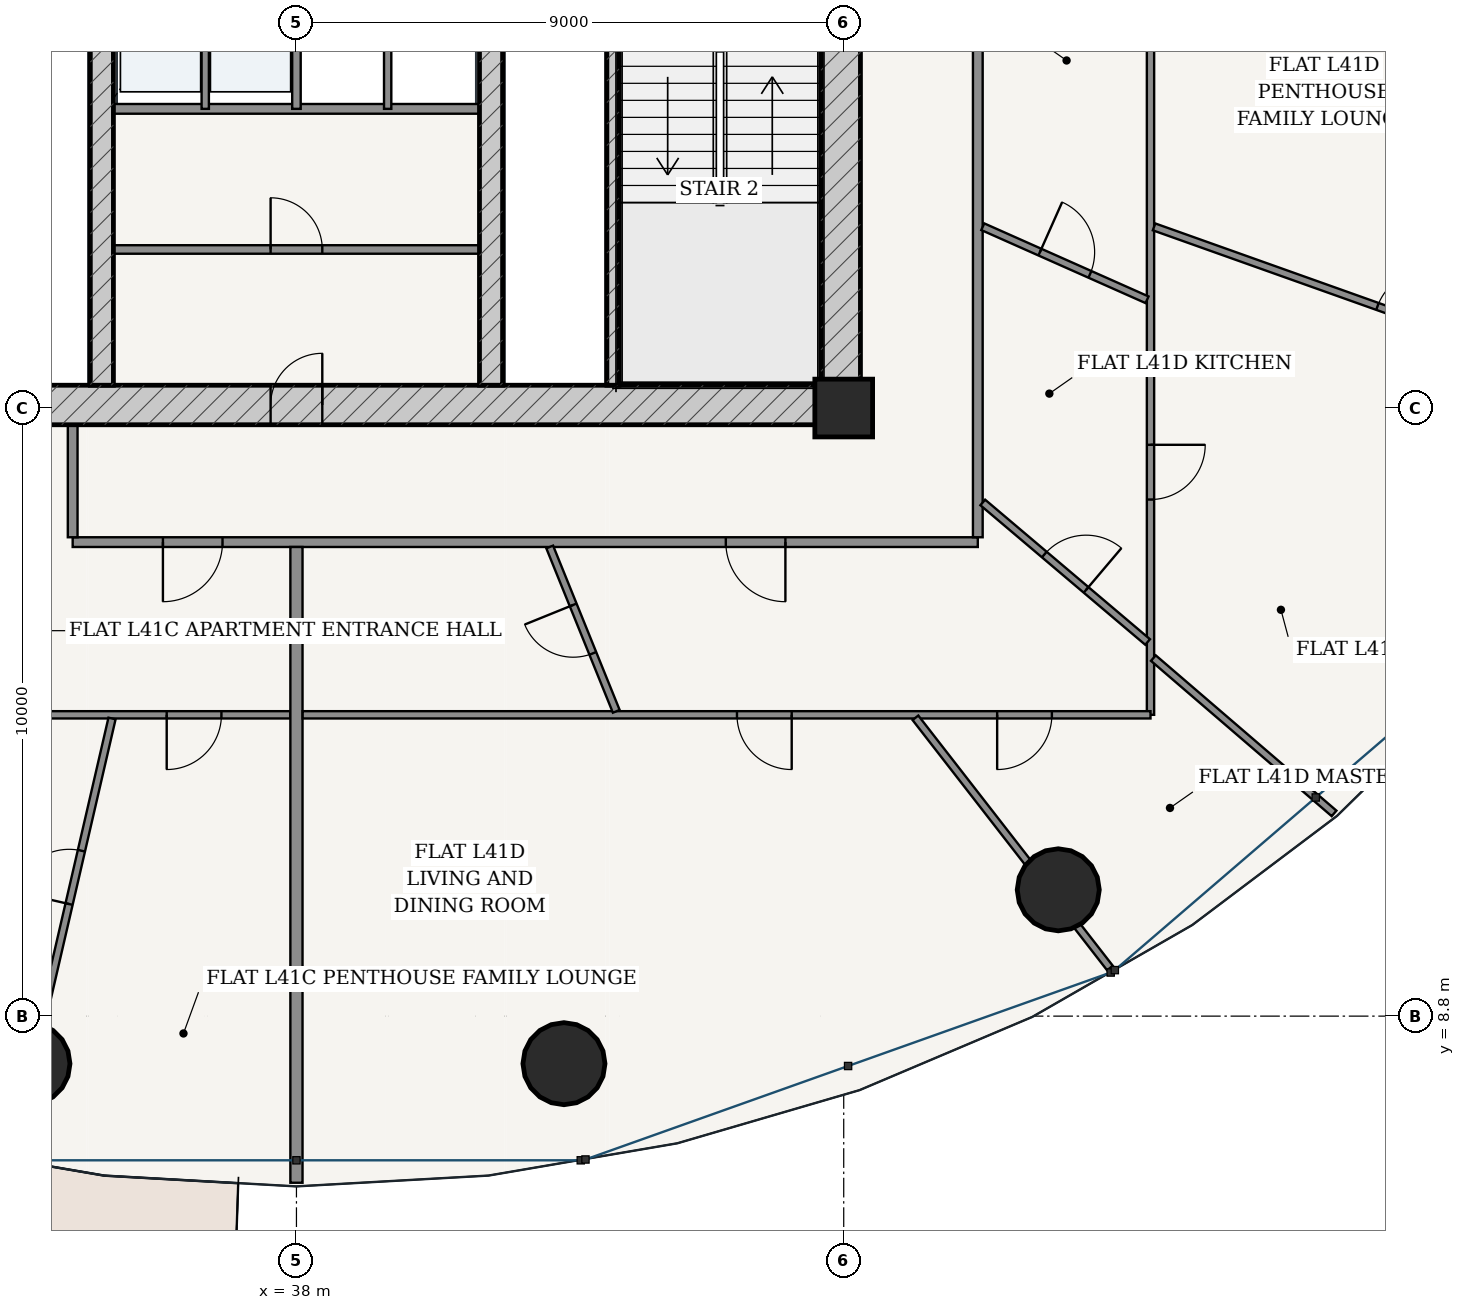
"""IFC4 building model, lengths in metres.
Left out: names, types, materials, properties, quantities, classifications, styles, units other than length and angle.
Written with IfcOpenShell. Run it as: python <this file> out.ifc"""

import sys

from ifc_helpers import new_model, si_unit, direction, frame, frame_2d, origin, origin_2d, place, context, subcontext, project, spatial, rectangle, hollow_circle, extrude, source, transform, mapped, element, fill, save


model = new_model("IFC4")
c1 = context("Model", 3, precision=1e-05, world=origin(), true_north=direction((-0.2419218956, 0.970295726276)))
c2 = subcontext(c1, "Body", "Model", "MODEL_VIEW")
j1 = project(units=[si_unit("LENGTHUNIT", "METRE"), si_unit("PLANEANGLEUNIT", "RADIAN")], contexts=[c1])
p1 = place(None, origin())
s1 = spatial("IfcSite", under=j1, at=p1, CompositionType="ELEMENT")
p2 = place(p1, origin())
s2 = spatial("IfcBuilding", under=s1, at=p2, CompositionType="ELEMENT")
p3 = place(p2, frame((0.0, 0.0, 157.0)))
s3 = spatial("IfcBuildingStorey", under=s2, at=p3, CompositionType="ELEMENT", Elevation=157.0)
p4 = place(p3, frame((47.0, 18.8, 0.0), z_axis=(0.0, 0.0, 1.0), x_axis=(1.0, 0.0, 0.0)))
e1 = element("IfcColumn", 1, at=p4, inside=s3, PredefinedType="COLUMN", context=c2, shape_type="SweptSolid", body=[
    extrude(rectangle(XDim=0.95, YDim=0.95, at=origin_2d()), origin(), (0.0, 0.0, 1.0), 3.6),
])
p5 = place(p3, frame((28.725, 18.85, 0.0), z_axis=(0.0, 0.0, 1.0), x_axis=(1.0, 0.0, 0.0)))
e2 = element("IfcWall", 2, at=p5, inside=s3, PredefinedType="SHEAR", context=c2, shape_type="SweptSolid", body=[
    extrude(rectangle(XDim=18.55, YDim=0.65, at=frame_2d((9.275, 0.0))), origin(), (0.0, 0.0, 1.0), 3.33),
])
p6 = place(p5, frame((8.85, 0.0, 0.0)))
e3 = element("IfcOpeningElement", 3, at=p6, cuts=e2, PredefinedType="OPENING", context=c2, shape_type="SweptSolid", body=[
    extrude(rectangle(XDim=0.85, YDim=2.1, at=frame_2d((0.425, 1.05))), frame((0.0, 0.335, 0.0), z_axis=(0.0, -1.0, 0.0), x_axis=(1.0, 0.0, 0.0)), (0.0, 0.0, 1.0), 0.67),
])
p7 = place(p3, frame((46.95, 19.175, 0.0), z_axis=(0.0, 0.0, 1.0), x_axis=(0.0, 1.0, 0.0)))
e4 = element("IfcWall", 4, at=p7, inside=s3, PredefinedType="SHEAR", context=c2, shape_type="SweptSolid", body=[
    extrude(rectangle(XDim=15.25, YDim=0.65, at=frame_2d((7.625, 0.0))), origin(), (0.0, 0.0, 1.0), 3.33),
])
p8 = place(p7, frame((9.875, 0.0, 0.0)))
e5 = element("IfcOpeningElement", 5, at=p8, cuts=e4, PredefinedType="OPENING", context=c2, shape_type="SweptSolid", body=[
    extrude(rectangle(XDim=1.5, YDim=2.2, at=frame_2d((0.75, 1.1))), frame((0.0, 0.335, 0.0), z_axis=(0.0, -1.0, 0.0), x_axis=(1.0, 0.0, 0.0)), (0.0, 0.0, 1.0), 0.67),
])
p9 = place(p3, frame((43.205, 19.175, 0.0), z_axis=(0.0, 0.0, 1.0), x_axis=(0.0, 1.0, 0.0)))
e6 = element("IfcWall", 6, at=p9, inside=s3, PredefinedType="SOLIDWALL", context=c2, shape_type="SweptSolid", body=[
    extrude(rectangle(XDim=7.375, YDim=0.2, at=frame_2d((3.688, 0.0))), origin(), (0.0, 0.0, 1.0), 3.33),
])
p10 = place(p3, frame((34.8, 19.175, 0.0), z_axis=(0.0, 0.0, 1.0), x_axis=(0.0, 1.0, 0.0)))
e7 = element("IfcWall", 7, at=p10, inside=s3, PredefinedType="SHEAR", context=c2, shape_type="SweptSolid", body=[
    extrude(rectangle(XDim=15.25, YDim=0.38, at=frame_2d((7.625, 0.0))), origin(), (0.0, 0.0, 1.0), 3.33),
])
p11 = place(p10, frame((7.8, 0.0, 0.0)))
e8 = element("IfcOpeningElement", 8, at=p11, cuts=e7, PredefinedType="OPENING", context=c2, shape_type="SweptSolid", body=[
    extrude(rectangle(XDim=1.05, YDim=2.15, at=frame_2d((0.525, 1.075))), frame((0.0, 0.2, 0.0), z_axis=(0.0, -1.0, 0.0), x_axis=(1.0, 0.0, 0.0)), (0.0, 0.0, 1.0), 0.4),
])
p12 = place(p3, frame((41.2, 19.175, 0.0), z_axis=(0.0, 0.0, 1.0), x_axis=(0.0, 1.0, 0.0)))
e9 = element("IfcWall", 9, at=p12, inside=s3, PredefinedType="SHEAR", context=c2, shape_type="SweptSolid", body=[
    extrude(rectangle(XDim=15.25, YDim=0.38, at=frame_2d((7.625, 0.0))), origin(), (0.0, 0.0, 1.0), 3.33),
])
p13 = place(p12, frame((7.8, 0.0, 0.0)))
e10 = element("IfcOpeningElement", 10, at=p13, cuts=e9, PredefinedType="OPENING", context=c2, shape_type="SweptSolid", body=[
    extrude(rectangle(XDim=1.05, YDim=2.15, at=frame_2d((0.525, 1.075))), frame((0.0, 0.2, 0.0), z_axis=(0.0, -1.0, 0.0), x_axis=(1.0, 0.0, 0.0)), (0.0, 0.0, 1.0), 0.4),
])
for number, where, z_axis, x_axis in (
    (11, (33.601, 8.018, 0.0), (0.0, 0.0, 1.0), (1.0, 0.0, 0.0)),
    (12, (42.399, 8.018, 0.0), (0.0, 0.0, 1.0), (1.0, 0.0, 0.0)),
    (13, (50.528, 10.877, 0.0), (0.0, 0.0, 1.0), (1.0, 0.0, 0.0)),
):
    element("IfcColumn", number, at=place(p3, frame(where, z_axis=z_axis, x_axis=x_axis)), inside=s3, PredefinedType="COLUMN", context=c2, shape_type="SweptSolid", body=[
        extrude(hollow_circle(Radius=0.675, WallThickness=0.042, at=origin_2d()), origin(), (0.0, 0.0, 1.0), 3.6),
    ])
p14 = place(p3, frame((34.99, 23.72, 0.0), z_axis=(0.0, 0.0, 1.0), x_axis=(1.0, 0.0, 0.0)))
e14 = element("IfcWall", 14, at=p14, inside=s3, PredefinedType="PARTITIONING", context=c2, shape_type="SweptSolid", body=[
    extrude(rectangle(XDim=6.02, YDim=0.16, at=frame_2d((3.01, 0.0))), origin(), (0.0, 0.0, 1.0), 3.33),
])
p15 = place(p3, frame((36.5, 23.72, 0.0), z_axis=(0.0, 0.0, 1.0), x_axis=(0.0, 1.0, 0.0)))
e15 = element("IfcWall", 15, at=p15, inside=s3, PredefinedType="PARTITIONING", context=c2, shape_type="SweptSolid", body=[
    extrude(rectangle(XDim=2.56, YDim=0.12, at=frame_2d((1.28, 0.0))), origin(), (0.0, 0.0, 1.0), 3.33),
])
p16 = place(p3, frame((38.0, 23.72, 0.0), z_axis=(0.0, 0.0, 1.0), x_axis=(0.0, 1.0, 0.0)))
e16 = element("IfcWall", 16, at=p16, inside=s3, PredefinedType="PARTITIONING", context=c2, shape_type="SweptSolid", body=[
    extrude(rectangle(XDim=2.56, YDim=0.14, at=frame_2d((1.28, 0.0))), origin(), (0.0, 0.0, 1.0), 3.33),
])
p17 = place(p3, frame((39.5, 23.72, 0.0), z_axis=(0.0, 0.0, 1.0), x_axis=(0.0, 1.0, 0.0)))
e17 = element("IfcWall", 17, at=p17, inside=s3, PredefinedType="PARTITIONING", context=c2, shape_type="SweptSolid", body=[
    extrude(rectangle(XDim=2.56, YDim=0.12, at=frame_2d((1.28, 0.0))), origin(), (0.0, 0.0, 1.0), 3.33),
])
p18 = place(p3, frame((34.99, 21.407, 0.0), z_axis=(0.0, 0.0, 1.0), x_axis=(1.0, 0.0, 0.0)))
e18 = element("IfcWall", 18, at=p18, inside=s3, PredefinedType="PARTITIONING", context=c2, shape_type="SweptSolid", body=[
    extrude(rectangle(XDim=6.02, YDim=0.14, at=frame_2d((3.01, 0.0))), origin(), (0.0, 0.0, 1.0), 3.33),
])
p19 = place(p18, frame((2.585, 0.0, 0.0)))
e19 = element("IfcOpeningElement", 19, at=p19, cuts=e18, PredefinedType="OPENING", context=c2, shape_type="SweptSolid", body=[
    extrude(rectangle(XDim=0.85, YDim=2.1, at=frame_2d((0.425, 1.05))), frame((0.0, 0.08, 0.0), z_axis=(0.0, -1.0, 0.0), x_axis=(1.0, 0.0, 0.0)), (0.0, 0.0, 1.0), 0.16),
])
p20 = place(p3, frame((34.32, 16.595, 0.0), z_axis=(0.0, 0.0, 1.0), x_axis=(1.0, 0.0, 0.0)))
e20 = element("IfcWall", 20, at=p20, inside=s3, PredefinedType="PARTITIONING", context=c2, shape_type="SweptSolid", body=[
    extrude(rectangle(XDim=14.885, YDim=0.16, at=frame_2d((7.442, 0.0))), origin(), (0.0, 0.0, 1.0), 2.776),
])
p21 = place(p20, frame((1.484, 0.0, 0.0)))
e21 = element("IfcOpeningElement", 21, at=p21, cuts=e20, PredefinedType="OPENING", context=c2, shape_type="SweptSolid", body=[
    extrude(rectangle(XDim=0.98, YDim=2.2, at=frame_2d((0.49, 1.1))), frame((0.0, 0.09, 0.0), z_axis=(0.0, -1.0, 0.0), x_axis=(1.0, 0.0, 0.0)), (0.0, 0.0, 1.0), 0.18),
])
p22 = place(p20, frame((10.741, 0.0, 0.0)))
e22 = element("IfcOpeningElement", 22, at=p22, cuts=e20, PredefinedType="OPENING", context=c2, shape_type="SweptSolid", body=[
    extrude(rectangle(XDim=0.98, YDim=2.2, at=frame_2d((0.49, 1.1))), frame((0.0, 0.09, 0.0), z_axis=(0.0, -1.0, 0.0), x_axis=(1.0, 0.0, 0.0)), (0.0, 0.0, 1.0), 0.18),
])
p23 = place(p3, frame((34.32, 16.675, 0.0), z_axis=(0.0, 0.0, 1.0), x_axis=(0.0, 1.0, 0.0)))
e23 = element("IfcWall", 23, at=p23, inside=s3, PredefinedType="PARTITIONING", context=c2, shape_type="SweptSolid", body=[
    extrude(rectangle(XDim=1.85, YDim=0.16, at=frame_2d((0.925, 0.0))), origin(), (0.0, 0.0, 1.0), 3.33),
])
p24 = place(p3, frame((49.205, 16.675, 0.0), z_axis=(0.0, 0.0, 1.0), x_axis=(0.0, 1.0, 0.0)))
e24 = element("IfcWall", 24, at=p24, inside=s3, PredefinedType="PARTITIONING", context=c2, shape_type="SweptSolid", body=[
    extrude(rectangle(XDim=18.4, YDim=0.16, at=frame_2d((9.2, 0.0))), origin(), (0.0, 0.0, 1.0), 2.776),
])
p25 = place(p24, frame((15.326, 0.0, 0.0)))
e25 = element("IfcOpeningElement", 25, at=p25, cuts=e24, PredefinedType="OPENING", context=c2, shape_type="SweptSolid", body=[
    extrude(rectangle(XDim=0.98, YDim=2.2, at=frame_2d((0.49, 1.1))), frame((0.0, 0.09, 0.0), z_axis=(0.0, -1.0, 0.0), x_axis=(1.0, 0.0, 0.0)), (0.0, 0.0, 1.0), 0.18),
])
p26 = place(p3, frame((37.898, 13.755, 0.0), z_axis=(0.0, 0.0, 1.0), x_axis=(-1.0, 0.0, 0.0)))
e26 = element("IfcWall", 26, at=p26, inside=s3, PredefinedType="PARTITIONING", context=c2, shape_type="SweptSolid", body=[
    extrude(rectangle(XDim=6.418, YDim=0.12, at=frame_2d((3.209, 0.0))), origin(), (0.0, 0.0, 1.0), 2.776),
])
p27 = place(p26, frame((1.132, 0.0, 0.0)))
e27 = element("IfcOpeningElement", 27, at=p27, cuts=e26, PredefinedType="OPENING", context=c2, shape_type="SweptSolid", body=[
    extrude(rectangle(XDim=0.9, YDim=2.15, at=frame_2d((0.45, 1.075))), frame((0.0, 0.07, 0.0), z_axis=(0.0, -1.0, 0.0), x_axis=(1.0, 0.0, 0.0)), (0.0, 0.0, 1.0), 0.14),
])
p28 = place(p3, frame((34.967, 13.695, 0.0), z_axis=(0.0, 0.0, 1.0), x_axis=(-0.225458405801, -0.974252794327, 0.0)))
e28 = element("IfcWall", 28, at=p28, inside=s3, PredefinedType="PARTITIONING", context=c2, shape_type="SweptSolid", body=[
    extrude(rectangle(XDim=7.383, YDim=0.12, at=frame_2d((3.691, 0.0))), origin(), (0.0, 0.0, 1.0), 2.776),
])
p29 = place(p28, frame((2.232, 0.0, 0.0)))
e29 = element("IfcOpeningElement", 29, at=p29, cuts=e28, PredefinedType="OPENING", context=c2, shape_type="SweptSolid", body=[
    extrude(rectangle(XDim=0.9, YDim=2.15, at=frame_2d((0.45, 1.075))), frame((0.0, 0.07, 0.0), z_axis=(0.0, -1.0, 0.0), x_axis=(1.0, 0.0, 0.0)), (0.0, 0.0, 1.0), 0.14),
])
p30 = place(p3, frame((38.0, 16.515, 0.0), z_axis=(0.0, 0.0, 1.0), x_axis=(0.0, -1.0, 0.0)))
e30 = element("IfcWall", 30, at=p30, inside=s3, PredefinedType="PARTITIONING", context=c2, shape_type="SweptSolid", body=[
    extrude(rectangle(XDim=10.455, YDim=0.2, at=frame_2d((5.228, 0.0))), origin(), (0.0, 0.0, 1.0), 2.846),
])
p31 = place(p3, frame((52.045, 26.698, 0.0), z_axis=(0.0, 0.0, 1.0), x_axis=(0.0, -1.0, 0.0)))
e31 = element("IfcWall", 31, at=p31, inside=s3, PredefinedType="PARTITIONING", context=c2, shape_type="SweptSolid", body=[
    extrude(rectangle(XDim=12.943, YDim=0.12, at=frame_2d((6.472, 0.0))), origin(), (0.0, 0.0, 1.0), 2.776),
])
p32 = place(p31, frame((8.503, 0.0, 0.0)))
e32 = element("IfcOpeningElement", 32, at=p32, cuts=e31, PredefinedType="OPENING", context=c2, shape_type="SweptSolid", body=[
    extrude(rectangle(XDim=0.9, YDim=2.15, at=frame_2d((0.45, 1.075))), frame((0.0, 0.07, 0.0), z_axis=(0.0, -1.0, 0.0), x_axis=(1.0, 0.0, 0.0)), (0.0, 0.0, 1.0), 0.14),
])
p33 = place(p3, frame((52.045, 13.755, 0.0), z_axis=(0.0, 0.0, 1.0), x_axis=(-1.0, 0.0, 0.0)))
e33 = element("IfcWall", 33, at=p33, inside=s3, PredefinedType="PARTITIONING", context=c2, shape_type="SweptSolid", body=[
    extrude(rectangle(XDim=13.943, YDim=0.12, at=frame_2d((6.971, 0.0))), origin(), (0.0, 0.0, 1.0), 2.776),
])
p34 = place(p33, frame((5.9, 0.0, 0.0)))
e34 = element("IfcOpeningElement", 34, at=p34, cuts=e33, PredefinedType="OPENING", context=c2, shape_type="SweptSolid", body=[
    extrude(rectangle(XDim=0.9, YDim=2.15, at=frame_2d((0.45, 1.075))), frame((0.0, 0.07, 0.0), z_axis=(0.0, -1.0, 0.0), x_axis=(1.0, 0.0, 0.0)), (0.0, 0.0, 1.0), 0.14),
])
p35 = place(p33, frame((1.622, 0.0, 0.0)))
e35 = element("IfcOpeningElement", 35, at=p35, cuts=e33, PredefinedType="OPENING", context=c2, shape_type="SweptSolid", body=[
    extrude(rectangle(XDim=0.9, YDim=2.15, at=frame_2d((0.45, 1.075))), frame((0.0, 0.07, 0.0), z_axis=(0.0, -1.0, 0.0), x_axis=(1.0, 0.0, 0.0)), (0.0, 0.0, 1.0), 0.14),
])
p36 = place(p3, frame((48.179, 13.706, 0.0), z_axis=(0.0, 0.0, 1.0), x_axis=(0.613759011764, -0.789493429662, 0.0)))
e36 = element("IfcWall", 36, at=p36, inside=s3, PredefinedType="PARTITIONING", context=c2, shape_type="SweptSolid", body=[
    extrude(rectangle(XDim=5.212, YDim=0.12, at=frame_2d((2.606, 0.0))), origin(), (0.0, 0.0, 1.0), 2.776),
])
p37 = place(p3, frame((52.092, 14.688, 0.0), z_axis=(0.0, 0.0, 1.0), x_axis=(0.758367509429, -0.651827216862, 0.0)))
e37 = element("IfcWall", 37, at=p37, inside=s3, PredefinedType="PARTITIONING", context=c2, shape_type="SweptSolid", body=[
    extrude(rectangle(XDim=3.918, YDim=0.12, at=frame_2d((1.959, 0.0))), origin(), (0.0, 0.0, 1.0), 2.846),
])
p38 = place(p3, frame((52.104, 21.779, 0.0), z_axis=(0.0, 0.0, 1.0), x_axis=(0.942081743482, -0.335383345736, 0.0)))
e38 = element("IfcWall", 38, at=p38, inside=s3, PredefinedType="PARTITIONING", context=c2, shape_type="SweptSolid", body=[
    extrude(rectangle(XDim=8.7, YDim=0.12, at=frame_2d((4.35, 0.0))), origin(), (0.0, 0.0, 1.0), 2.846),
])
p39 = place(p38, frame((3.9, 0.0, 0.0)))
e39 = element("IfcOpeningElement", 39, at=p39, cuts=e38, PredefinedType="OPENING", context=c2, shape_type="SweptSolid", body=[
    extrude(rectangle(XDim=0.9, YDim=2.15, at=frame_2d((0.45, 1.075))), frame((0.0, 0.07, 0.0), z_axis=(0.0, -1.0, 0.0), x_axis=(1.0, 0.0, 0.0)), (0.0, 0.0, 1.0), 0.14),
])
p40 = place(p3, frame((42.165, 16.515, 0.0), z_axis=(0.0, 0.0, 1.0), x_axis=(0.375386324206, -0.926868441365, 0.0)))
e40 = element("IfcWall", 40, at=p40, inside=s3, PredefinedType="PARTITIONING", context=c2, shape_type="SweptSolid", body=[
    extrude(rectangle(XDim=2.916, YDim=0.12, at=frame_2d((1.458, 0.0))), origin(), (0.0, 0.0, 1.0), 3.005),
])
p41 = place(p40, frame((1.028, 0.0, 0.0)))
e41 = element("IfcOpeningElement", 41, at=p41, cuts=e40, PredefinedType="OPENING", context=c2, shape_type="SweptSolid", body=[
    extrude(rectangle(XDim=0.86, YDim=2.15, at=frame_2d((0.43, 1.075))), frame((0.0, 0.07, 0.0), z_axis=(0.0, -1.0, 0.0), x_axis=(1.0, 0.0, 0.0)), (0.0, 0.0, 1.0), 0.14),
])
p42 = place(p3, frame((49.287, 17.248, 0.0), z_axis=(0.0, 0.0, 1.0), x_axis=(0.763274158734, -0.646074731443, 0.0)))
e42 = element("IfcWall", 42, at=p42, inside=s3, PredefinedType="PARTITIONING", context=c2, shape_type="SweptSolid", body=[
    extrude(rectangle(XDim=3.552, YDim=0.12, at=frame_2d((1.776, 0.0))), origin(), (0.0, 0.0, 1.0), 3.005),
])
p43 = place(p42, frame((1.326, 0.0, 0.0)))
e43 = element("IfcOpeningElement", 43, at=p43, cuts=e42, PredefinedType="OPENING", context=c2, shape_type="SweptSolid", body=[
    extrude(rectangle(XDim=0.9, YDim=2.15, at=frame_2d((0.45, 1.075))), frame((0.0, 0.07, 0.0), z_axis=(0.0, -1.0, 0.0), x_axis=(1.0, 0.0, 0.0)), (0.0, 0.0, 1.0), 0.14),
])
p44 = place(p3, frame((49.287, 21.781, 0.0), z_axis=(0.0, 0.0, 1.0), x_axis=(0.913743428873, -0.406291700864, 0.0)))
e44 = element("IfcWall", 44, at=p44, inside=s3, PredefinedType="PARTITIONING", context=c2, shape_type="SweptSolid", body=[
    extrude(rectangle(XDim=2.957, YDim=0.12, at=frame_2d((1.478, 0.0))), origin(), (0.0, 0.0, 1.0), 3.33),
])
p45 = place(p44, frame((1.028, 0.0, 0.0)))
e45 = element("IfcOpeningElement", 45, at=p45, cuts=e44, PredefinedType="OPENING", context=c2, shape_type="SweptSolid", body=[
    extrude(rectangle(XDim=0.9, YDim=2.15, at=frame_2d((0.45, 1.075))), frame((0.0, 0.07, 0.0), z_axis=(0.0, -1.0, 0.0), x_axis=(1.0, 0.0, 0.0)), (0.0, 0.0, 1.0), 0.14),
])
m1 = source(origin(), c2, "Body", "SweptSolid", [
    extrude(rectangle(XDim=0.85, YDim=2.1, at=frame_2d((0.425, 1.05))), frame((0.0, 0.025, 0.0), z_axis=(0.0, -1.0, 0.0), x_axis=(1.0, 0.0, 0.0)), (0.0, 0.0, 1.0), 0.05),
])
p46 = place(p6, origin())
e46 = element("IfcDoor", 46, at=p46, inside=s3, OperationType="SINGLE_SWING_RIGHT", PredefinedType="DOOR", context=c2, shape_type="MappedRepresentation", body=[
    mapped(m1, transform((0.0, 0.0, 0.0), scale=1.0)),
])
fill(e3, e46)
p47 = place(p19, origin())
e47 = element("IfcDoor", 47, at=p47, inside=s3, OperationType="SINGLE_SWING_LEFT", PredefinedType="DOOR", context=c2, shape_type="MappedRepresentation", body=[
    mapped(m1, transform((0.0, 0.0, 0.0), scale=1.0)),
])
fill(e19, e47)
m2 = source(origin(), c2, "Body", "SweptSolid", [
    extrude(rectangle(XDim=0.98, YDim=2.2, at=frame_2d((0.49, 1.1))), frame((0.0, 0.025, 0.0), z_axis=(0.0, -1.0, 0.0), x_axis=(1.0, 0.0, 0.0)), (0.0, 0.0, 1.0), 0.05),
])
p48 = place(p21, frame((0.98, 0.0, 0.0), z_axis=(0.0, 0.0, 1.0), x_axis=(-1.0, 0.0, 0.0)))
e48 = element("IfcDoor", 48, at=p48, inside=s3, OperationType="SINGLE_SWING_RIGHT", PredefinedType="DOOR", context=c2, shape_type="MappedRepresentation", body=[
    mapped(m2, transform((0.0, 0.0, 0.0), scale=1.0)),
])
fill(e21, e48)
m3 = source(origin(), c2, "Body", "SweptSolid", [
    extrude(rectangle(XDim=0.9, YDim=2.15, at=frame_2d((0.45, 1.075))), frame((0.0, 0.025, 0.0), z_axis=(0.0, -1.0, 0.0), x_axis=(1.0, 0.0, 0.0)), (0.0, 0.0, 1.0), 0.05),
])
p49 = place(p27, origin())
e49 = element("IfcDoor", 49, at=p49, inside=s3, OperationType="SINGLE_SWING_RIGHT", PredefinedType="DOOR", context=c2, shape_type="MappedRepresentation", body=[
    mapped(m3, transform((0.0, 0.0, 0.0), scale=1.0)),
])
fill(e27, e49)
p50 = place(p29, frame((0.9, 0.0, 0.0), z_axis=(0.0, 0.0, 1.0), x_axis=(-1.0, 0.0, 0.0)))
e50 = element("IfcDoor", 50, at=p50, inside=s3, OperationType="SINGLE_SWING_LEFT", PredefinedType="DOOR", context=c2, shape_type="MappedRepresentation", body=[
    mapped(m3, transform((0.0, 0.0, 0.0), scale=1.0)),
])
fill(e29, e50)
p51 = place(p22, frame((0.98, 0.0, 0.0), z_axis=(0.0, 0.0, 1.0), x_axis=(-1.0, 0.0, 0.0)))
e51 = element("IfcDoor", 51, at=p51, inside=s3, OperationType="SINGLE_SWING_LEFT", PredefinedType="DOOR", context=c2, shape_type="MappedRepresentation", body=[
    mapped(m2, transform((0.0, 0.0, 0.0), scale=1.0)),
])
fill(e22, e51)
m4 = source(origin(), c2, "Body", "SweptSolid", [
    extrude(rectangle(XDim=0.86, YDim=2.15, at=frame_2d((0.43, 1.075))), frame((0.0, 0.025, 0.0), z_axis=(0.0, -1.0, 0.0), x_axis=(1.0, 0.0, 0.0)), (0.0, 0.0, 1.0), 0.05),
])
p52 = place(p41, frame((0.86, 0.0, 0.0), z_axis=(0.0, 0.0, 1.0), x_axis=(-1.0, 0.0, 0.0)))
e52 = element("IfcDoor", 52, at=p52, inside=s3, OperationType="SINGLE_SWING_RIGHT", PredefinedType="DOOR", context=c2, shape_type="MappedRepresentation", body=[
    mapped(m4, transform((0.0, 0.0, 0.0), scale=1.0)),
])
fill(e41, e52)
p53 = place(p34, origin())
e53 = element("IfcDoor", 53, at=p53, inside=s3, OperationType="SINGLE_SWING_LEFT", PredefinedType="DOOR", context=c2, shape_type="MappedRepresentation", body=[
    mapped(m3, transform((0.0, 0.0, 0.0), scale=1.0)),
])
fill(e34, e53)
p54 = place(p43, origin())
e54 = element("IfcDoor", 54, at=p54, inside=s3, OperationType="SINGLE_SWING_RIGHT", PredefinedType="DOOR", context=c2, shape_type="MappedRepresentation", body=[
    mapped(m3, transform((0.0, 0.0, 0.0), scale=1.0)),
])
fill(e43, e54)
p55 = place(p45, origin())
e55 = element("IfcDoor", 55, at=p55, inside=s3, OperationType="SINGLE_SWING_LEFT", PredefinedType="DOOR", context=c2, shape_type="MappedRepresentation", body=[
    mapped(m3, transform((0.0, 0.0, 0.0), scale=1.0)),
])
fill(e45, e55)
p56 = place(p35, origin())
e56 = element("IfcDoor", 56, at=p56, inside=s3, OperationType="SINGLE_SWING_RIGHT", PredefinedType="DOOR", context=c2, shape_type="MappedRepresentation", body=[
    mapped(m3, transform((0.0, 0.0, 0.0), scale=1.0)),
])
fill(e35, e56)
p57 = place(p32, origin())
e57 = element("IfcDoor", 57, at=p57, inside=s3, OperationType="SINGLE_SWING_LEFT", PredefinedType="DOOR", context=c2, shape_type="MappedRepresentation", body=[
    mapped(m3, transform((0.0, 0.0, 0.0), scale=1.0)),
])
fill(e32, e57)
p58 = place(p39, origin())
e58 = element("IfcDoor", 58, at=p58, inside=s3, OperationType="SINGLE_SWING_RIGHT", PredefinedType="DOOR", context=c2, shape_type="MappedRepresentation", body=[
    mapped(m3, transform((0.0, 0.0, 0.0), scale=1.0)),
])
fill(e39, e58)
save(model, sys.argv[1])
